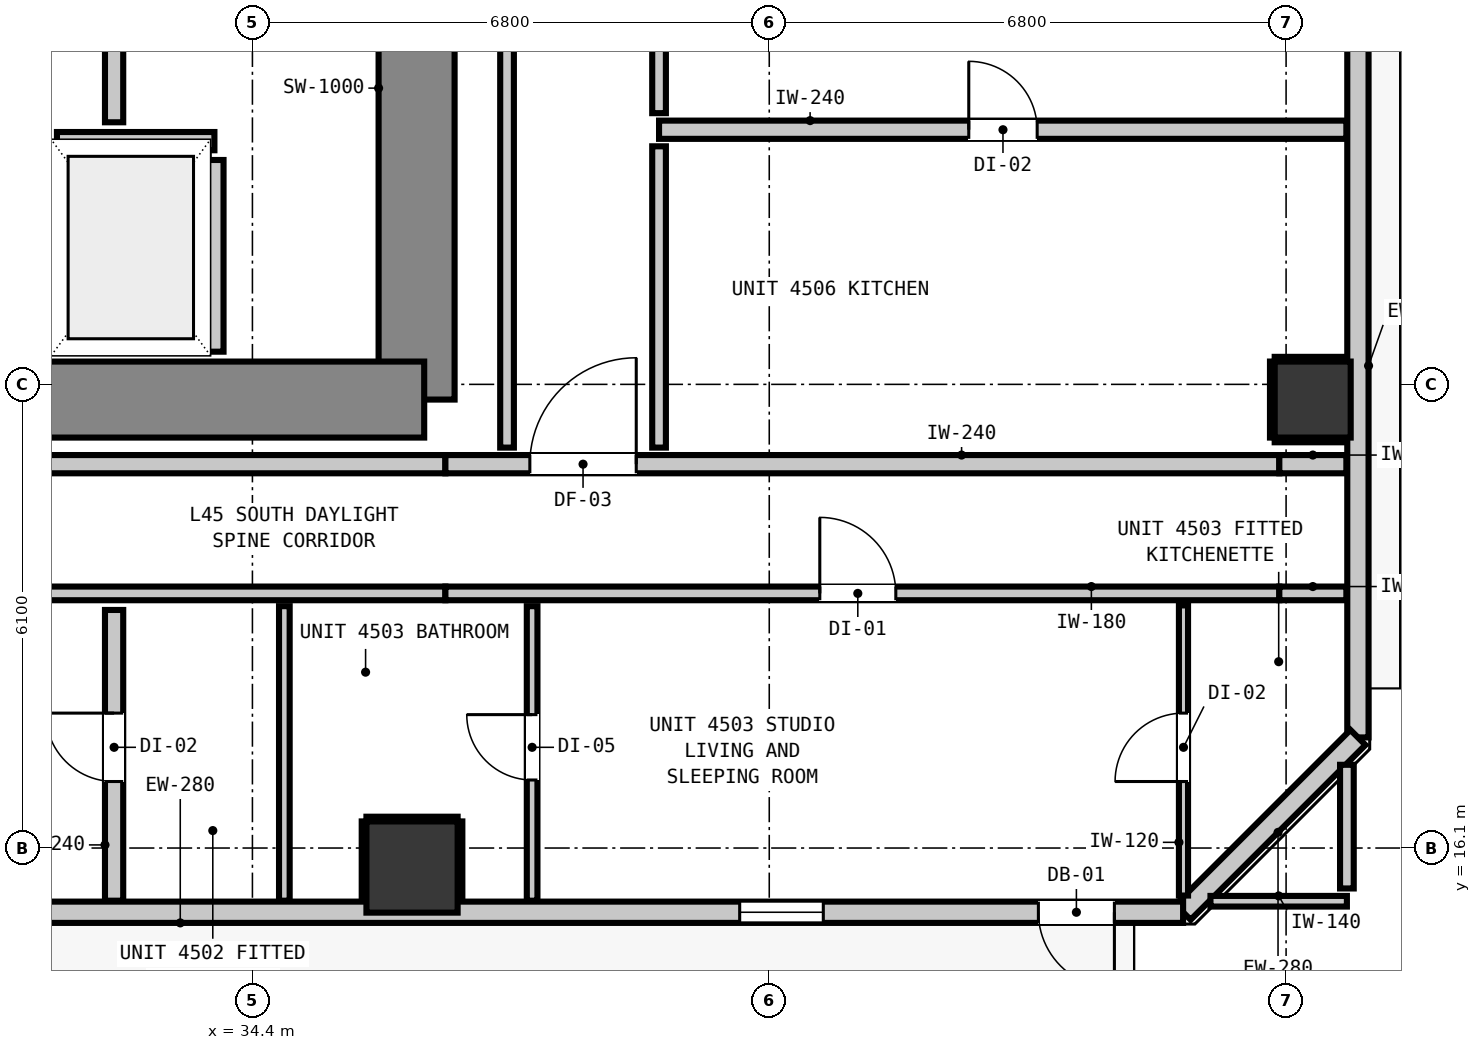
"""IFC4 building model, lengths in metres.
Left out: names, types, materials, properties, quantities, classifications, styles, units other than length and angle.
Written with IfcOpenShell. Run it as: python <this file> out.ifc"""

import sys

from ifc_helpers import new_model, si_unit, direction, frame, frame_2d, origin, origin_2d, place, context, subcontext, project, spatial, rectangle, extrude, element, fill, save


model = new_model("IFC4")
c1 = context("Model", 3, precision=1e-05, world=origin(), true_north=direction((0.0, 1.0)))
c2 = subcontext(c1, "Body", "Model", "MODEL_VIEW")
j1 = project(units=[si_unit("LENGTHUNIT", "METRE"), si_unit("PLANEANGLEUNIT", "RADIAN")], contexts=[c1])
p1 = place(None, origin())
s1 = spatial("IfcSite", under=j1, at=p1, CompositionType="ELEMENT")
p2 = place(p1, origin())
s2 = spatial("IfcBuilding", under=s1, at=p2, CompositionType="ELEMENT")
p3 = place(p2, frame((0.0, 0.0, 155.88)))
s3 = spatial("IfcBuildingStorey", under=s2, at=p3, CompositionType="ELEMENT", Elevation=155.88)
p4 = place(p3, frame((36.56, 22.0, 0.0), z_axis=(0.0, 0.0, 1.0), x_axis=(0.0, 1.0, 0.0)))
e1 = element("IfcWall", 1, at=p4, inside=s3, PredefinedType="SHEAR", context=c2, shape_type="SweptSolid", body=[
    extrude(rectangle(XDim=8.195, YDim=1.0, at=frame_2d((4.098, 0.0))), origin(), (0.0, 0.0, 1.0), 3.32),
])
p5 = place(p3, frame((29.705, 22.0, 0.0), z_axis=(0.0, 0.0, 1.0), x_axis=(1.0, 0.0, 0.0)))
e2 = element("IfcWall", 2, at=p5, inside=s3, PredefinedType="SHEAR", context=c2, shape_type="SweptSolid", body=[
    extrude(rectangle(XDim=6.955, YDim=1.0, at=frame_2d((3.478, 0.0))), origin(), (0.0, 0.0, 1.0), 3.32),
])
p6 = place(p3, frame((36.5, 15.85, 0.0), z_axis=(0.0, 0.0, 1.0), x_axis=(1.0, 0.0, 0.0)))
e3 = element("IfcColumn", 3, at=p6, inside=s3, PredefinedType="COLUMN", context=c2, shape_type="SweptSolid", body=[
    extrude(rectangle(XDim=1.2, YDim=1.2, at=origin_2d()), origin(), (0.0, 0.0, 1.0), 3.32),
])
p7 = place(p3, frame((48.35, 22.0, 0.0), z_axis=(0.0, 0.0, 1.0), x_axis=(1.0, 0.0, 0.0)))
e4 = element("IfcColumn", 4, at=p7, inside=s3, PredefinedType="COLUMN", context=c2, shape_type="SweptSolid", body=[
    extrude(rectangle(XDim=1.0, YDim=1.0, at=origin_2d()), origin(), (0.0, 0.0, 1.0), 3.32),
])
p8 = place(p3, frame((48.945, 49.845, 0.0), z_axis=(0.0, 0.0, 1.0), x_axis=(0.0, -1.0, 0.0)))
e5 = element("IfcWall", 5, at=p8, inside=s3, PredefinedType="STANDARD", context=c2, shape_type="SweptSolid", body=[
    extrude(rectangle(XDim=32.29, YDim=0.28, at=frame_2d((16.145, 0.0))), origin(), (0.0, 0.0, 1.0), 3.08),
])
p9 = place(p8, frame((0.904, 0.0, 0.0)))
e6 = element("IfcOpeningElement", 6, at=p9, cuts=e5, PredefinedType="OPENING", context=c2, shape_type="SweptSolid", body=[
    extrude(rectangle(XDim=1.0, YDim=2.15, at=frame_2d((0.5, 1.075))), frame((0.0, 0.15, 0.0), z_axis=(0.0, -1.0, 0.0), x_axis=(1.0, 0.0, 0.0)), (0.0, 0.0, 1.0), 0.3),
])
p10 = place(p8, frame((3.049, 0.0, 0.85)))
e7 = element("IfcOpeningElement", 7, at=p10, cuts=e5, PredefinedType="OPENING", context=c2, shape_type="SweptSolid", body=[
    extrude(rectangle(XDim=1.1, YDim=2.05, at=frame_2d((0.55, 1.025))), frame((0.0, 0.15, 0.0), z_axis=(0.0, -1.0, 0.0), x_axis=(1.0, 0.0, 0.0)), (0.0, 0.0, 1.0), 0.3),
])
p11 = place(p8, frame((21.311, 0.0, 0.85)))
e8 = element("IfcOpeningElement", 8, at=p11, cuts=e5, PredefinedType="OPENING", context=c2, shape_type="SweptSolid", body=[
    extrude(rectangle(XDim=1.1, YDim=2.05, at=frame_2d((0.55, 1.025))), frame((0.0, 0.15, 0.0), z_axis=(0.0, -1.0, 0.0), x_axis=(1.0, 0.0, 0.0)), (0.0, 0.0, 1.0), 0.3),
])
p12 = place(p8, frame((12.32, 0.0, 0.85)))
e9 = element("IfcOpeningElement", 9, at=p12, cuts=e5, PredefinedType="OPENING", context=c2, shape_type="SweptSolid", body=[
    extrude(rectangle(XDim=1.1, YDim=2.05, at=frame_2d((0.55, 1.025))), frame((0.0, 0.15, 0.0), z_axis=(0.0, -1.0, 0.0), x_axis=(1.0, 0.0, 0.0)), (0.0, 0.0, 1.0), 0.3),
])
p13 = place(p3, frame((48.945, 17.555, 0.0), z_axis=(0.0, 0.0, 1.0), x_axis=(-0.707106781187, -0.707106781187, 0.0)))
e10 = element("IfcWall", 10, at=p13, inside=s3, PredefinedType="STANDARD", context=c2, shape_type="SweptSolid", body=[
    extrude(rectangle(XDim=3.253, YDim=0.28, at=frame_2d((1.626, 0.0))), origin(), (0.0, 0.0, 1.0), 3.08),
])
p14 = place(p3, frame((46.645, 15.255, 0.0), z_axis=(0.0, 0.0, 1.0), x_axis=(-1.0, 0.0, 0.0)))
e11 = element("IfcWall", 11, at=p14, inside=s3, PredefinedType="STANDARD", context=c2, shape_type="SweptSolid", body=[
    extrude(rectangle(XDim=35.09, YDim=0.28, at=frame_2d((17.545, 0.0))), origin(), (0.0, 0.0, 1.0), 3.08),
])
p15 = place(p14, frame((0.904, 0.0, 0.0)))
e12 = element("IfcOpeningElement", 12, at=p15, cuts=e11, PredefinedType="OPENING", context=c2, shape_type="SweptSolid", body=[
    extrude(rectangle(XDim=1.0, YDim=2.15, at=frame_2d((0.5, 1.075))), frame((0.0, 0.15, 0.0), z_axis=(0.0, -1.0, 0.0), x_axis=(1.0, 0.0, 0.0)), (0.0, 0.0, 1.0), 0.3),
])
p16 = place(p14, frame((30.66, 0.0, 0.85)))
e13 = element("IfcOpeningElement", 13, at=p16, cuts=e11, PredefinedType="OPENING", context=c2, shape_type="SweptSolid", body=[
    extrude(rectangle(XDim=1.1, YDim=2.05, at=frame_2d((0.55, 1.025))), frame((0.0, 0.15, 0.0), z_axis=(0.0, -1.0, 0.0), x_axis=(1.0, 0.0, 0.0)), (0.0, 0.0, 1.0), 0.3),
])
p17 = place(p14, frame((20.555, 0.0, 0.85)))
e14 = element("IfcOpeningElement", 14, at=p17, cuts=e11, PredefinedType="OPENING", context=c2, shape_type="SweptSolid", body=[
    extrude(rectangle(XDim=1.1, YDim=2.05, at=frame_2d((0.55, 1.025))), frame((0.0, 0.15, 0.0), z_axis=(0.0, -1.0, 0.0), x_axis=(1.0, 0.0, 0.0)), (0.0, 0.0, 1.0), 0.3),
])
p18 = place(p14, frame((4.734, 0.0, 0.85)))
e15 = element("IfcOpeningElement", 15, at=p18, cuts=e11, PredefinedType="OPENING", context=c2, shape_type="SweptSolid", body=[
    extrude(rectangle(XDim=1.1, YDim=2.05, at=frame_2d((0.55, 1.025))), frame((0.0, 0.15, 0.0), z_axis=(0.0, -1.0, 0.0), x_axis=(1.0, 0.0, 0.0)), (0.0, 0.0, 1.0), 0.3),
])
p19 = place(p3, frame((31.7, 22.63, 0.0), z_axis=(0.0, 0.0, 1.0), x_axis=(0.0, 1.0, 0.0)))
e16 = element("IfcWall", 16, at=p19, inside=s3, PredefinedType="PARTITIONING", context=c2, shape_type="SweptSolid", body=[
    extrude(rectangle(XDim=2.522, YDim=0.24, at=frame_2d((1.261, 0.0))), origin(), (0.0, 0.0, 1.0), 3.08),
])
p20 = place(p3, frame((31.828, 25.4, 0.0), z_axis=(0.0, 0.0, 1.0), x_axis=(1.0, 0.0, 0.0)))
e17 = element("IfcWall", 17, at=p20, inside=s3, PredefinedType="PARTITIONING", context=c2, shape_type="SweptSolid", body=[
    extrude(rectangle(XDim=2.072, YDim=0.24, at=frame_2d((1.036, 0.0))), origin(), (0.0, 0.0, 1.0), 3.08),
])
p21 = place(p3, frame((33.9, 22.63, 0.0), z_axis=(0.0, 0.0, 1.0), x_axis=(0.0, 1.0, 0.0)))
e18 = element("IfcWall", 18, at=p21, inside=s3, PredefinedType="PARTITIONING", context=c2, shape_type="SweptSolid", body=[
    extrude(rectangle(XDim=2.522, YDim=0.24, at=frame_2d((1.261, 0.0))), origin(), (0.0, 0.0, 1.0), 3.08),
])
p22 = place(p3, frame((9.407, 21.15, 0.0), z_axis=(0.0, 0.0, 1.0), x_axis=(1.0, 0.0, 0.0)))
e19 = element("IfcWall", 19, at=p22, inside=s3, PredefinedType="PARTITIONING", context=c2, shape_type="SweptSolid", body=[
    extrude(rectangle(XDim=27.532, YDim=0.24, at=frame_2d((13.766, 0.0))), origin(), (0.0, 0.0, 1.0), 3.08),
])
p23 = place(p22, frame((8.803, 0.0, 0.0)))
e20 = element("IfcOpeningElement", 20, at=p23, cuts=e19, PredefinedType="OPENING", context=c2, shape_type="SweptSolid", body=[
    extrude(rectangle(XDim=1.1, YDim=2.15, at=frame_2d((0.55, 1.075))), frame((0.0, 0.13, 0.0), z_axis=(0.0, -1.0, 0.0), x_axis=(1.0, 0.0, 0.0)), (0.0, 0.0, 1.0), 0.26),
])
p24 = place(p22, frame((1.192, 0.0, 0.0)))
e21 = element("IfcOpeningElement", 21, at=p24, cuts=e19, PredefinedType="OPENING", context=c2, shape_type="SweptSolid", body=[
    extrude(rectangle(XDim=1.4, YDim=2.15, at=frame_2d((0.7, 1.075))), frame((0.0, 0.13, 0.0), z_axis=(0.0, -1.0, 0.0), x_axis=(1.0, 0.0, 0.0)), (0.0, 0.0, 1.0), 0.26),
])
p25 = place(p3, frame((36.939, 21.15, 0.0), z_axis=(0.0, 0.0, 1.0), x_axis=(1.0, 0.0, 0.0)))
e22 = element("IfcWall", 22, at=p25, inside=s3, PredefinedType="PARTITIONING", context=c2, shape_type="SweptSolid", body=[
    extrude(rectangle(XDim=10.972, YDim=0.24, at=frame_2d((5.486, 0.0))), origin(), (0.0, 0.0, 1.0), 2.565),
])
p26 = place(p25, frame((1.111, 0.0, 0.0)))
e23 = element("IfcOpeningElement", 23, at=p26, cuts=e22, PredefinedType="OPENING", context=c2, shape_type="SweptSolid", body=[
    extrude(rectangle(XDim=1.4, YDim=2.15, at=frame_2d((0.7, 1.075))), frame((0.0, 0.13, 0.0), z_axis=(0.0, -1.0, 0.0), x_axis=(1.0, 0.0, 0.0)), (0.0, 0.0, 1.0), 0.26),
])
p27 = place(p3, frame((47.911, 21.15, 0.0), z_axis=(0.0, 0.0, 1.0), x_axis=(1.0, 0.0, 0.0)))
e24 = element("IfcWall", 24, at=p27, inside=s3, PredefinedType="PARTITIONING", context=c2, shape_type="SweptSolid", body=[
    extrude(rectangle(XDim=0.882, YDim=0.24, at=frame_2d((0.441, 0.0))), origin(), (0.0, 0.0, 1.0), 3.08),
])
p28 = place(p3, frame((39.75, 25.55, 0.0), z_axis=(0.0, 0.0, 1.0), x_axis=(1.0, 0.0, 0.0)))
e25 = element("IfcWall", 25, at=p28, inside=s3, PredefinedType="PARTITIONING", context=c2, shape_type="SweptSolid", body=[
    extrude(rectangle(XDim=9.043, YDim=0.24, at=frame_2d((4.521, 0.0))), origin(), (0.0, 0.0, 1.0), 3.08),
])
p29 = place(p28, frame((4.075, 0.0, 0.0)))
e26 = element("IfcOpeningElement", 26, at=p29, cuts=e25, PredefinedType="OPENING", context=c2, shape_type="SweptSolid", body=[
    extrude(rectangle(XDim=0.9, YDim=2.1, at=frame_2d((0.45, 1.05))), frame((0.0, 0.13, 0.0), z_axis=(0.0, -1.0, 0.0), x_axis=(1.0, 0.0, 0.0)), (0.0, 0.0, 1.0), 0.26),
])
p30 = place(p3, frame((9.407, 19.45, 0.0), z_axis=(0.0, 0.0, 1.0), x_axis=(1.0, 0.0, 0.0)))
e27 = element("IfcWall", 27, at=p30, inside=s3, PredefinedType="PARTITIONING", context=c2, shape_type="SweptSolid", body=[
    extrude(rectangle(XDim=27.532, YDim=0.18, at=frame_2d((13.766, 0.0))), origin(), (0.0, 0.0, 1.0), 3.08),
])
p31 = place(p30, frame((4.303, 0.0, 0.0)))
e28 = element("IfcOpeningElement", 28, at=p31, cuts=e27, PredefinedType="OPENING", context=c2, shape_type="SweptSolid", body=[
    extrude(rectangle(XDim=1.0, YDim=2.15, at=frame_2d((0.5, 1.075))), frame((0.0, 0.1, 0.0), z_axis=(0.0, -1.0, 0.0), x_axis=(1.0, 0.0, 0.0)), (0.0, 0.0, 1.0), 0.2),
])
p32 = place(p30, frame((17.618, 0.0, 0.0)))
e29 = element("IfcOpeningElement", 29, at=p32, cuts=e27, PredefinedType="OPENING", context=c2, shape_type="SweptSolid", body=[
    extrude(rectangle(XDim=1.0, YDim=2.15, at=frame_2d((0.5, 1.075))), frame((0.0, 0.1, 0.0), z_axis=(0.0, -1.0, 0.0), x_axis=(1.0, 0.0, 0.0)), (0.0, 0.0, 1.0), 0.2),
])
p33 = place(p3, frame((36.939, 19.45, 0.0), z_axis=(0.0, 0.0, 1.0), x_axis=(1.0, 0.0, 0.0)))
e30 = element("IfcWall", 30, at=p33, inside=s3, PredefinedType="PARTITIONING", context=c2, shape_type="SweptSolid", body=[
    extrude(rectangle(XDim=10.972, YDim=0.18, at=frame_2d((5.486, 0.0))), origin(), (0.0, 0.0, 1.0), 2.565),
])
p34 = place(p33, frame((4.926, 0.0, 0.0)))
e31 = element("IfcOpeningElement", 31, at=p34, cuts=e30, PredefinedType="OPENING", context=c2, shape_type="SweptSolid", body=[
    extrude(rectangle(XDim=1.0, YDim=2.15, at=frame_2d((0.5, 1.075))), frame((0.0, 0.1, 0.0), z_axis=(0.0, -1.0, 0.0), x_axis=(1.0, 0.0, 0.0)), (0.0, 0.0, 1.0), 0.2),
])
p35 = place(p3, frame((47.911, 19.45, 0.0), z_axis=(0.0, 0.0, 1.0), x_axis=(1.0, 0.0, 0.0)))
e32 = element("IfcWall", 32, at=p35, inside=s3, PredefinedType="PARTITIONING", context=c2, shape_type="SweptSolid", body=[
    extrude(rectangle(XDim=0.882, YDim=0.18, at=frame_2d((0.441, 0.0))), origin(), (0.0, 0.0, 1.0), 3.08),
])
p36 = place(p3, frame((47.005, 15.4, 0.0), z_axis=(0.0, 0.0, 1.0), x_axis=(1.0, 0.0, 0.0)))
e33 = element("IfcWall", 33, at=p36, inside=s3, PredefinedType="PARTITIONING", context=c2, shape_type="SweptSolid", body=[
    extrude(rectangle(XDim=1.795, YDim=0.14, at=frame_2d((0.897, 0.0))), origin(), (0.0, 0.0, 1.0), 3.08),
])
p37 = place(p3, frame((32.58, 15.407, 0.0), z_axis=(0.0, 0.0, 1.0), x_axis=(0.0, 1.0, 0.0)))
e34 = element("IfcWall", 34, at=p37, inside=s3, PredefinedType="PARTITIONING", context=c2, shape_type="SweptSolid", body=[
    extrude(rectangle(XDim=3.825, YDim=0.24, at=frame_2d((1.913, 0.0))), origin(), (0.0, 0.0, 1.0), 3.08),
])
p38 = place(p37, frame((1.568, 0.0, 0.0)))
e35 = element("IfcOpeningElement", 35, at=p38, cuts=e34, PredefinedType="OPENING", context=c2, shape_type="SweptSolid", body=[
    extrude(rectangle(XDim=0.9, YDim=2.1, at=frame_2d((0.45, 1.05))), frame((0.0, 0.13, 0.0), z_axis=(0.0, -1.0, 0.0), x_axis=(1.0, 0.0, 0.0)), (0.0, 0.0, 1.0), 0.26),
])
p39 = place(p3, frame((32.58, 25.648, 0.0), z_axis=(0.0, 0.0, 1.0), x_axis=(0.0, 1.0, 0.0)))
e36 = element("IfcWall", 36, at=p39, inside=s3, PredefinedType="PARTITIONING", context=c2, shape_type="SweptSolid", body=[
    extrude(rectangle(XDim=4.622, YDim=0.24, at=frame_2d((2.311, 0.0))), origin(), (0.0, 0.0, 1.0), 3.08),
])
p40 = place(p3, frame((37.75, 21.368, 0.0), z_axis=(0.0, 0.0, 1.0), x_axis=(0.0, 1.0, 0.0)))
e37 = element("IfcWall", 37, at=p40, inside=s3, PredefinedType="PARTITIONING", context=c2, shape_type="SweptSolid", body=[
    extrude(rectangle(XDim=18.694, YDim=0.18, at=frame_2d((9.347, 0.0))), origin(), (0.0, 0.0, 1.0), 3.08),
])
p41 = place(p3, frame((39.75, 21.368, 0.0), z_axis=(0.0, 0.0, 1.0), x_axis=(0.0, 1.0, 0.0)))
e38 = element("IfcWall", 38, at=p41, inside=s3, PredefinedType="PARTITIONING", context=c2, shape_type="SweptSolid", body=[
    extrude(rectangle(XDim=3.964, YDim=0.18, at=frame_2d((1.982, 0.0))), origin(), (0.0, 0.0, 1.0), 3.08),
])
p42 = place(p3, frame((39.75, 25.768, 0.0), z_axis=(0.0, 0.0, 1.0), x_axis=(0.0, 1.0, 0.0)))
e39 = element("IfcWall", 39, at=p42, inside=s3, PredefinedType="PARTITIONING", context=c2, shape_type="SweptSolid", body=[
    extrude(rectangle(XDim=9.014, YDim=0.18, at=frame_2d((4.507, 0.0))), origin(), (0.0, 0.0, 1.0), 3.08),
])
p43 = place(p42, frame((4.041, 0.0, 0.0)))
e40 = element("IfcOpeningElement", 40, at=p43, cuts=e39, PredefinedType="OPENING", context=c2, shape_type="SweptSolid", body=[
    extrude(rectangle(XDim=1.0, YDim=2.15, at=frame_2d((0.5, 1.075))), frame((0.0, 0.1, 0.0), z_axis=(0.0, -1.0, 0.0), x_axis=(1.0, 0.0, 0.0)), (0.0, 0.0, 1.0), 0.2),
])
p44 = place(p3, frame((48.8, 15.568, 0.0), z_axis=(0.0, 0.0, 1.0), x_axis=(0.0, 1.0, 0.0)))
e41 = element("IfcWall", 41, at=p44, inside=s3, PredefinedType="PARTITIONING", context=c2, shape_type="SweptSolid", body=[
    extrude(rectangle(XDim=1.627, YDim=0.18, at=frame_2d((0.813, 0.0))), origin(), (0.0, 0.0, 1.0), 3.08),
])
p45 = place(p3, frame((34.82, 15.407, 0.0), z_axis=(0.0, 0.0, 1.0), x_axis=(0.0, 1.0, 0.0)))
e42 = element("IfcWall", 42, at=p45, inside=s3, PredefinedType="PARTITIONING", context=c2, shape_type="SweptSolid", body=[
    extrude(rectangle(XDim=3.875, YDim=0.14, at=frame_2d((1.938, 0.0))), origin(), (0.0, 0.0, 1.0), 3.08),
])
p46 = place(p3, frame((38.08, 15.407, 0.0), z_axis=(0.0, 0.0, 1.0), x_axis=(0.0, 1.0, 0.0)))
e43 = element("IfcWall", 43, at=p46, inside=s3, PredefinedType="PARTITIONING", context=c2, shape_type="SweptSolid", body=[
    extrude(rectangle(XDim=3.875, YDim=0.14, at=frame_2d((1.938, 0.0))), origin(), (0.0, 0.0, 1.0), 3.08),
])
p47 = place(p46, frame((1.588, 0.0, 0.0)))
e44 = element("IfcOpeningElement", 44, at=p47, cuts=e43, PredefinedType="OPENING", context=c2, shape_type="SweptSolid", body=[
    extrude(rectangle(XDim=0.86, YDim=2.02, at=frame_2d((0.43, 1.01))), frame((0.0, 0.08, 0.0), z_axis=(0.0, -1.0, 0.0), x_axis=(1.0, 0.0, 0.0)), (0.0, 0.0, 1.0), 0.16),
])
p48 = place(p3, frame((46.65, 15.475, 0.0), z_axis=(0.0, 0.0, 1.0), x_axis=(0.0, 1.0, 0.0)))
e45 = element("IfcWall", 45, at=p48, inside=s3, PredefinedType="PARTITIONING", context=c2, shape_type="SweptSolid", body=[
    extrude(rectangle(XDim=3.817, YDim=0.12, at=frame_2d((1.908, 0.0))), origin(), (0.0, 0.0, 1.0), 3.08),
])
p49 = place(p48, frame((1.5, 0.0, 0.0)))
e46 = element("IfcOpeningElement", 46, at=p49, cuts=e45, PredefinedType="OPENING", context=c2, shape_type="SweptSolid", body=[
    extrude(rectangle(XDim=0.9, YDim=2.1, at=frame_2d((0.45, 1.05))), frame((0.0, 0.07, 0.0), z_axis=(0.0, -1.0, 0.0), x_axis=(1.0, 0.0, 0.0)), (0.0, 0.0, 1.0), 0.14),
])
p50 = place(p3, frame((35.9, 16.482, 0.0), z_axis=(0.0, 0.0, 1.0), x_axis=(1.0, 0.0, 0.0)))
e47 = element("IfcWall", 47, at=p50, inside=s3, PredefinedType="PARTITIONING", context=c2, shape_type="SweptSolid", body=[
    extrude(rectangle(XDim=1.2, YDim=0.06, at=frame_2d((0.6, 0.0))), origin(), (0.0, 0.0, 1.0), 1.45),
])
for number, where, z_axis, x_axis in (
    (48, (35.868, 15.41, 0.0), (0.0, 0.0, 1.0), (0.0, 1.0, 0.0)),
    (49, (37.132, 15.41, 0.0), (0.0, 0.0, 1.0), (0.0, 1.0, 0.0)),
):
    element("IfcWall", number, at=place(p3, frame(where, z_axis=z_axis, x_axis=x_axis)), inside=s3, PredefinedType="PARTITIONING", context=c2, shape_type="SweptSolid", body=[
        extrude(rectangle(XDim=1.04, YDim=0.06, at=frame_2d((0.52, 0.0))), origin(), (0.0, 0.0, 1.0), 1.45),
    ])
for number, where, z_axis, x_axis in (
    (50, (47.85, 21.468, 0.0), (0.0, 0.0, 1.0), (1.0, 0.0, 0.0)),
    (51, (47.85, 22.532, 0.0), (0.0, 0.0, 1.0), (1.0, 0.0, 0.0)),
):
    element("IfcWall", number, at=place(p3, frame(where, z_axis=z_axis, x_axis=x_axis)), inside=s3, PredefinedType="PARTITIONING", context=c2, shape_type="SweptSolid", body=[
        extrude(rectangle(XDim=0.94, YDim=0.06, at=frame_2d((0.47, 0.0))), origin(), (0.0, 0.0, 1.0), 1.45),
    ])
p51 = place(p3, frame((47.818, 21.5, 0.0), z_axis=(0.0, 0.0, 1.0), x_axis=(0.0, 1.0, 0.0)))
e52 = element("IfcWall", 52, at=p51, inside=s3, PredefinedType="PARTITIONING", context=c2, shape_type="SweptSolid", body=[
    extrude(rectangle(XDim=1.0, YDim=0.06, at=frame_2d((0.5, 0.0))), origin(), (0.0, 0.0, 1.0), 1.45),
])
p52 = place(p15, origin())
e53 = element("IfcDoor", 53, at=p52, inside=s3, OperationType="SINGLE_SWING_LEFT", PredefinedType="DOOR", context=c2, shape_type="SweptSolid", body=[
    extrude(rectangle(XDim=1.0, YDim=2.15, at=frame_2d((0.5, 1.075))), frame((0.0, 0.025, 0.0), z_axis=(0.0, -1.0, 0.0), x_axis=(1.0, 0.0, 0.0)), (0.0, 0.0, 1.0), 0.05),
])
fill(e12, e53)
p53 = place(p18, origin())
e54 = element("IfcWindow", 54, at=p53, inside=s3, PartitioningType="SINGLE_PANEL", PredefinedType="WINDOW", context=c2, shape_type="SweptSolid", body=[
    extrude(rectangle(XDim=1.1, YDim=2.05, at=frame_2d((0.55, 1.025))), frame((0.0, 0.03, 0.0), z_axis=(0.0, -1.0, 0.0), x_axis=(1.0, 0.0, 0.0)), (0.0, 0.0, 1.0), 0.06),
])
fill(e15, e54)
p54 = place(p26, origin())
e55 = element("IfcDoor", 55, at=p54, inside=s3, OperationType="SINGLE_SWING_RIGHT", PredefinedType="DOOR", context=c2, shape_type="SweptSolid", body=[
    extrude(rectangle(XDim=1.4, YDim=2.15, at=frame_2d((0.7, 1.075))), frame((0.0, 0.025, 0.0), z_axis=(0.0, -1.0, 0.0), x_axis=(1.0, 0.0, 0.0)), (0.0, 0.0, 1.0), 0.05),
])
fill(e23, e55)
p55 = place(p38, origin())
e56 = element("IfcDoor", 56, at=p55, inside=s3, OperationType="SINGLE_SWING_RIGHT", PredefinedType="DOOR", context=c2, shape_type="SweptSolid", body=[
    extrude(rectangle(XDim=0.9, YDim=2.1, at=frame_2d((0.45, 1.05))), frame((0.0, 0.025, 0.0), z_axis=(0.0, -1.0, 0.0), x_axis=(1.0, 0.0, 0.0)), (0.0, 0.0, 1.0), 0.05),
])
fill(e35, e56)
p56 = place(p34, origin())
e57 = element("IfcDoor", 57, at=p56, inside=s3, OperationType="SINGLE_SWING_LEFT", PredefinedType="DOOR", context=c2, shape_type="SweptSolid", body=[
    extrude(rectangle(XDim=1.0, YDim=2.15, at=frame_2d((0.5, 1.075))), frame((0.0, 0.025, 0.0), z_axis=(0.0, -1.0, 0.0), x_axis=(1.0, 0.0, 0.0)), (0.0, 0.0, 1.0), 0.05),
])
fill(e31, e57)
p57 = place(p47, origin())
e58 = element("IfcDoor", 58, at=p57, inside=s3, OperationType="SINGLE_SWING_RIGHT", PredefinedType="DOOR", context=c2, shape_type="SweptSolid", body=[
    extrude(rectangle(XDim=0.86, YDim=2.02, at=frame_2d((0.43, 1.01))), frame((0.0, 0.025, 0.0), z_axis=(0.0, -1.0, 0.0), x_axis=(1.0, 0.0, 0.0)), (0.0, 0.0, 1.0), 0.05),
])
fill(e44, e58)
p58 = place(p49, origin())
e59 = element("IfcDoor", 59, at=p58, inside=s3, OperationType="SINGLE_SWING_LEFT", PredefinedType="DOOR", context=c2, shape_type="SweptSolid", body=[
    extrude(rectangle(XDim=0.9, YDim=2.1, at=frame_2d((0.45, 1.05))), frame((0.0, 0.025, 0.0), z_axis=(0.0, -1.0, 0.0), x_axis=(1.0, 0.0, 0.0)), (0.0, 0.0, 1.0), 0.05),
])
fill(e46, e59)
p59 = place(p29, origin())
e60 = element("IfcDoor", 60, at=p59, inside=s3, OperationType="SINGLE_SWING_LEFT", PredefinedType="DOOR", context=c2, shape_type="SweptSolid", body=[
    extrude(rectangle(XDim=0.9, YDim=2.1, at=frame_2d((0.45, 1.05))), frame((0.0, 0.025, 0.0), z_axis=(0.0, -1.0, 0.0), x_axis=(1.0, 0.0, 0.0)), (0.0, 0.0, 1.0), 0.05),
])
fill(e26, e60)
save(model, sys.argv[1])
